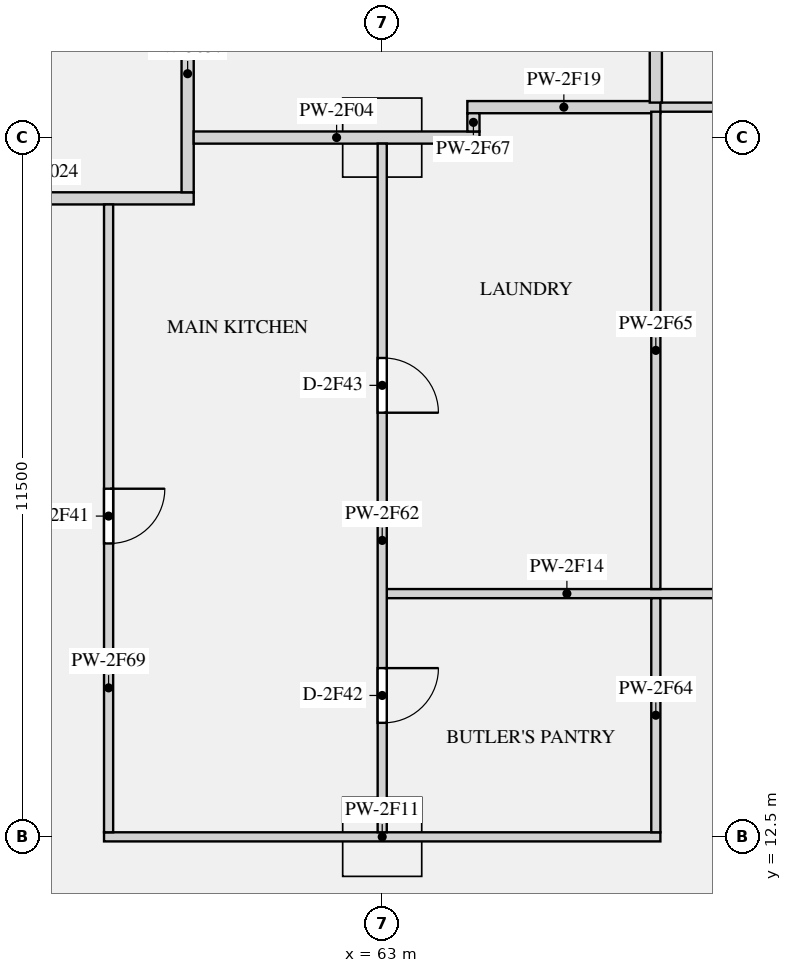
"""IFC4 building model, lengths in metres.
Left out: names, types, materials, properties, quantities, classifications, styles, units other than length and angle.
Written with IfcOpenShell. Run it as: python <this file> out.ifc"""

import sys

from ifc_helpers import new_model, si_unit, direction, frame, frame_2d, origin, origin_2d, place, context, subcontext, project, spatial, rectangle, extrude, element, fill, save


model = new_model("IFC4")
c1 = context("Model", 3, precision=1e-05, world=origin(), true_north=direction((0.0, 1.0)))
c2 = subcontext(c1, "Body", "Model", "MODEL_VIEW")
j1 = project(units=[si_unit("LENGTHUNIT", "METRE"), si_unit("PLANEANGLEUNIT", "RADIAN")], contexts=[c1])
p1 = place(None, origin())
s1 = spatial("IfcSite", under=j1, at=p1, CompositionType="ELEMENT")
p2 = place(p1, origin())
s2 = spatial("IfcBuilding", under=s1, at=p2, CompositionType="ELEMENT")
p3 = place(p2, frame((0.0, 0.0, 124.5)))
s3 = spatial("IfcBuildingStorey", under=s2, at=p3, CompositionType="ELEMENT", Elevation=124.5)
for number, where, z_axis, x_axis in (
    (1, (63.0, 24.0, 0.0), (0.0, 0.0, 1.0), (1.0, 0.0, 0.0)),
    (2, (63.0, 12.5, 0.0), (0.0, 0.0, 1.0), (1.0, 0.0, 0.0)),
):
    element("IfcColumn", number, at=place(p3, frame(where, z_axis=z_axis, x_axis=x_axis)), inside=s3, PredefinedType="COLUMN", context=c2, shape_type="SweptSolid", body=[
        extrude(rectangle(XDim=1.3, YDim=1.3, at=origin_2d()), origin(), (0.0, 0.0, 1.0), 3.15),
    ])
p4 = place(p3, frame((54.9, 23.0, 0.0), z_axis=(0.0, 0.0, 1.0), x_axis=(1.0, 0.0, 0.0)))
e3 = element("IfcWall", 3, at=p4, inside=s3, PredefinedType="PARTITIONING", context=c2, shape_type="SweptSolid", body=[
    extrude(rectangle(XDim=5.0, YDim=0.2, at=frame_2d((2.5, 0.0))), origin(), (0.0, 0.0, 1.0), 2.83),
])
p5 = place(p3, frame((59.8, 23.1, 0.0), z_axis=(0.0, 0.0, 1.0), x_axis=(0.0, 1.0, 0.0)))
e4 = element("IfcWall", 4, at=p5, inside=s3, PredefinedType="PARTITIONING", context=c2, shape_type="SweptSolid", body=[
    extrude(rectangle(XDim=3.9, YDim=0.2, at=frame_2d((1.95, 0.0))), origin(), (0.0, 0.0, 1.0), 2.83),
])
p6 = place(p3, frame((59.9, 24.0, 0.0), z_axis=(0.0, 0.0, 1.0), x_axis=(1.0, 0.0, 0.0)))
e5 = element("IfcWall", 5, at=p6, inside=s3, PredefinedType="PARTITIONING", context=c2, shape_type="SweptSolid", body=[
    extrude(rectangle(XDim=4.7, YDim=0.2, at=frame_2d((2.35, 0.0))), origin(), (0.0, 0.0, 1.0), 2.83),
])
p7 = place(p3, frame((58.425, 12.5, 0.0), z_axis=(0.0, 0.0, 1.0), x_axis=(1.0, 0.0, 0.0)))
e6 = element("IfcWall", 6, at=p7, inside=s3, PredefinedType="PARTITIONING", context=c2, shape_type="SweptSolid", body=[
    extrude(rectangle(XDim=9.15, YDim=0.15, at=frame_2d((4.575, 0.0))), origin(), (0.0, 0.0, 1.0), 2.83),
])
p8 = place(p3, frame((63.075, 16.5, 0.0), z_axis=(0.0, 0.0, 1.0), x_axis=(1.0, 0.0, 0.0)))
e7 = element("IfcWall", 7, at=p8, inside=s3, PredefinedType="PARTITIONING", context=c2, shape_type="SweptSolid", body=[
    extrude(rectangle(XDim=10.175, YDim=0.15, at=frame_2d((5.087, 0.0))), origin(), (0.0, 0.0, 1.0), 2.83),
])
p9 = place(p8, frame((5.925, 0.0, 0.0)))
e8 = element("IfcOpeningElement", 8, at=p9, cuts=e7, PredefinedType="OPENING", context=c2, shape_type="SweptSolid", body=[
    extrude(rectangle(XDim=1.5, YDim=2.1, at=frame_2d((0.75, 1.05))), frame((0.0, 0.085, 0.0), z_axis=(0.0, -1.0, 0.0), x_axis=(1.0, 0.0, 0.0)), (0.0, 0.0, 1.0), 0.17),
])
p10 = place(p3, frame((67.425, 24.5, 0.0), z_axis=(0.0, 0.0, 1.0), x_axis=(1.0, 0.0, 0.0)))
e9 = element("IfcWall", 9, at=p10, inside=s3, PredefinedType="PARTITIONING", context=c2, shape_type="SweptSolid", body=[
    extrude(rectangle(XDim=4.65, YDim=0.15, at=frame_2d((2.325, 0.0))), origin(), (0.0, 0.0, 1.0), 2.83),
])
p11 = place(p10, frame((1.25, 0.0, 0.0)))
e10 = element("IfcOpeningElement", 10, at=p11, cuts=e9, PredefinedType="OPENING", context=c2, shape_type="SweptSolid", body=[
    extrude(rectangle(XDim=1.5, YDim=2.1, at=frame_2d((0.75, 1.05))), frame((0.0, 0.085, 0.0), z_axis=(0.0, -1.0, 0.0), x_axis=(1.0, 0.0, 0.0)), (0.0, 0.0, 1.0), 0.17),
])
p12 = place(p3, frame((64.4, 24.5, 0.0), z_axis=(0.0, 0.0, 1.0), x_axis=(1.0, 0.0, 0.0)))
e11 = element("IfcWall", 11, at=p12, inside=s3, PredefinedType="PARTITIONING", context=c2, shape_type="SweptSolid", body=[
    extrude(rectangle(XDim=3.175, YDim=0.2, at=frame_2d((1.587, 0.0))), origin(), (0.0, 0.0, 1.0), 2.83),
])
p13 = place(p3, frame((63.0, 12.575, 0.0), z_axis=(0.0, 0.0, 1.0), x_axis=(0.0, 1.0, 0.0)))
e12 = element("IfcWall", 12, at=p13, inside=s3, PredefinedType="PARTITIONING", context=c2, shape_type="SweptSolid", body=[
    extrude(rectangle(XDim=11.325, YDim=0.15, at=frame_2d((5.663, 0.0))), origin(), (0.0, 0.0, 1.0), 2.83),
])
p14 = place(p13, frame((1.8, 0.0, 0.0)))
e13 = element("IfcOpeningElement", 13, at=p14, cuts=e12, PredefinedType="OPENING", context=c2, shape_type="SweptSolid", body=[
    extrude(rectangle(XDim=0.9, YDim=2.1, at=frame_2d((0.45, 1.05))), frame((0.0, 0.085, 0.0), z_axis=(0.0, -1.0, 0.0), x_axis=(1.0, 0.0, 0.0)), (0.0, 0.0, 1.0), 0.17),
])
p15 = place(p13, frame((6.9, 0.0, 0.0)))
e14 = element("IfcOpeningElement", 14, at=p15, cuts=e12, PredefinedType="OPENING", context=c2, shape_type="SweptSolid", body=[
    extrude(rectangle(XDim=0.9, YDim=2.1, at=frame_2d((0.45, 1.05))), frame((0.0, 0.085, 0.0), z_axis=(0.0, -1.0, 0.0), x_axis=(1.0, 0.0, 0.0)), (0.0, 0.0, 1.0), 0.17),
])
p16 = place(p3, frame((67.5, 12.575, 0.0), z_axis=(0.0, 0.0, 1.0), x_axis=(0.0, 1.0, 0.0)))
e15 = element("IfcWall", 15, at=p16, inside=s3, PredefinedType="PARTITIONING", context=c2, shape_type="SweptSolid", body=[
    extrude(rectangle(XDim=3.85, YDim=0.15, at=frame_2d((1.925, 0.0))), origin(), (0.0, 0.0, 1.0), 2.83),
])
p17 = place(p3, frame((67.5, 16.575, 0.0), z_axis=(0.0, 0.0, 1.0), x_axis=(0.0, 1.0, 0.0)))
e16 = element("IfcWall", 16, at=p17, inside=s3, PredefinedType="PARTITIONING", context=c2, shape_type="SweptSolid", body=[
    extrude(rectangle(XDim=7.85, YDim=0.15, at=frame_2d((3.925, 0.0))), origin(), (0.0, 0.0, 1.0), 2.83),
])
p18 = place(p3, frame((67.5, 24.575, 0.0), z_axis=(0.0, 0.0, 1.0), x_axis=(0.0, 1.0, 0.0)))
e17 = element("IfcWall", 17, at=p18, inside=s3, PredefinedType="PARTITIONING", context=c2, shape_type="SweptSolid", body=[
    extrude(rectangle(XDim=20.175, YDim=0.2, at=frame_2d((10.087, 0.0))), origin(), (0.0, 0.0, 1.0), 2.83),
])
p19 = place(p3, frame((64.5, 24.1, 0.0), z_axis=(0.0, 0.0, 1.0), x_axis=(0.0, 1.0, 0.0)))
e18 = element("IfcWall", 18, at=p19, inside=s3, PredefinedType="PARTITIONING", context=c2, shape_type="SweptSolid", body=[
    extrude(rectangle(XDim=0.3, YDim=0.2, at=frame_2d((0.15, 0.0))), origin(), (0.0, 0.0, 1.0), 2.83),
])
p20 = place(p3, frame((58.5, 12.575, 0.0), z_axis=(0.0, 0.0, 1.0), x_axis=(0.0, 1.0, 0.0)))
e19 = element("IfcWall", 19, at=p20, inside=s3, PredefinedType="PARTITIONING", context=c2, shape_type="SweptSolid", body=[
    extrude(rectangle(XDim=10.325, YDim=0.15, at=frame_2d((5.163, 0.0))), origin(), (0.0, 0.0, 1.0), 2.83),
])
p21 = place(p20, frame((4.75, 0.0, 0.0)))
e20 = element("IfcOpeningElement", 20, at=p21, cuts=e19, PredefinedType="OPENING", context=c2, shape_type="SweptSolid", body=[
    extrude(rectangle(XDim=0.9, YDim=2.1, at=frame_2d((0.45, 1.05))), frame((0.0, 0.085, 0.0), z_axis=(0.0, -1.0, 0.0), x_axis=(1.0, 0.0, 0.0)), (0.0, 0.0, 1.0), 0.17),
])
p22 = place(p21, frame((0.9, 0.0, 0.0), z_axis=(0.0, 0.0, 1.0), x_axis=(-1.0, 0.0, 0.0)))
e21 = element("IfcDoor", 21, at=p22, inside=s3, OperationType="SINGLE_SWING_LEFT", PredefinedType="DOOR", context=c2, shape_type="SweptSolid", body=[
    extrude(rectangle(XDim=0.9, YDim=2.1, at=frame_2d((0.45, 1.05))), frame((0.0, 0.025, 0.0), z_axis=(0.0, -1.0, 0.0), x_axis=(1.0, 0.0, 0.0)), (0.0, 0.0, 1.0), 0.05),
])
fill(e20, e21)
p23 = place(p14, frame((0.9, 0.0, 0.0), z_axis=(0.0, 0.0, 1.0), x_axis=(-1.0, 0.0, 0.0)))
e22 = element("IfcDoor", 22, at=p23, inside=s3, OperationType="SINGLE_SWING_LEFT", PredefinedType="DOOR", context=c2, shape_type="SweptSolid", body=[
    extrude(rectangle(XDim=0.9, YDim=2.1, at=frame_2d((0.45, 1.05))), frame((0.0, 0.025, 0.0), z_axis=(0.0, -1.0, 0.0), x_axis=(1.0, 0.0, 0.0)), (0.0, 0.0, 1.0), 0.05),
])
fill(e13, e22)
p24 = place(p15, frame((0.9, 0.0, 0.0), z_axis=(0.0, 0.0, 1.0), x_axis=(-1.0, 0.0, 0.0)))
e23 = element("IfcDoor", 23, at=p24, inside=s3, OperationType="SINGLE_SWING_RIGHT", PredefinedType="DOOR", context=c2, shape_type="SweptSolid", body=[
    extrude(rectangle(XDim=0.9, YDim=2.1, at=frame_2d((0.45, 1.05))), frame((0.0, 0.025, 0.0), z_axis=(0.0, -1.0, 0.0), x_axis=(1.0, 0.0, 0.0)), (0.0, 0.0, 1.0), 0.05),
])
fill(e14, e23)
save(model, sys.argv[1])
